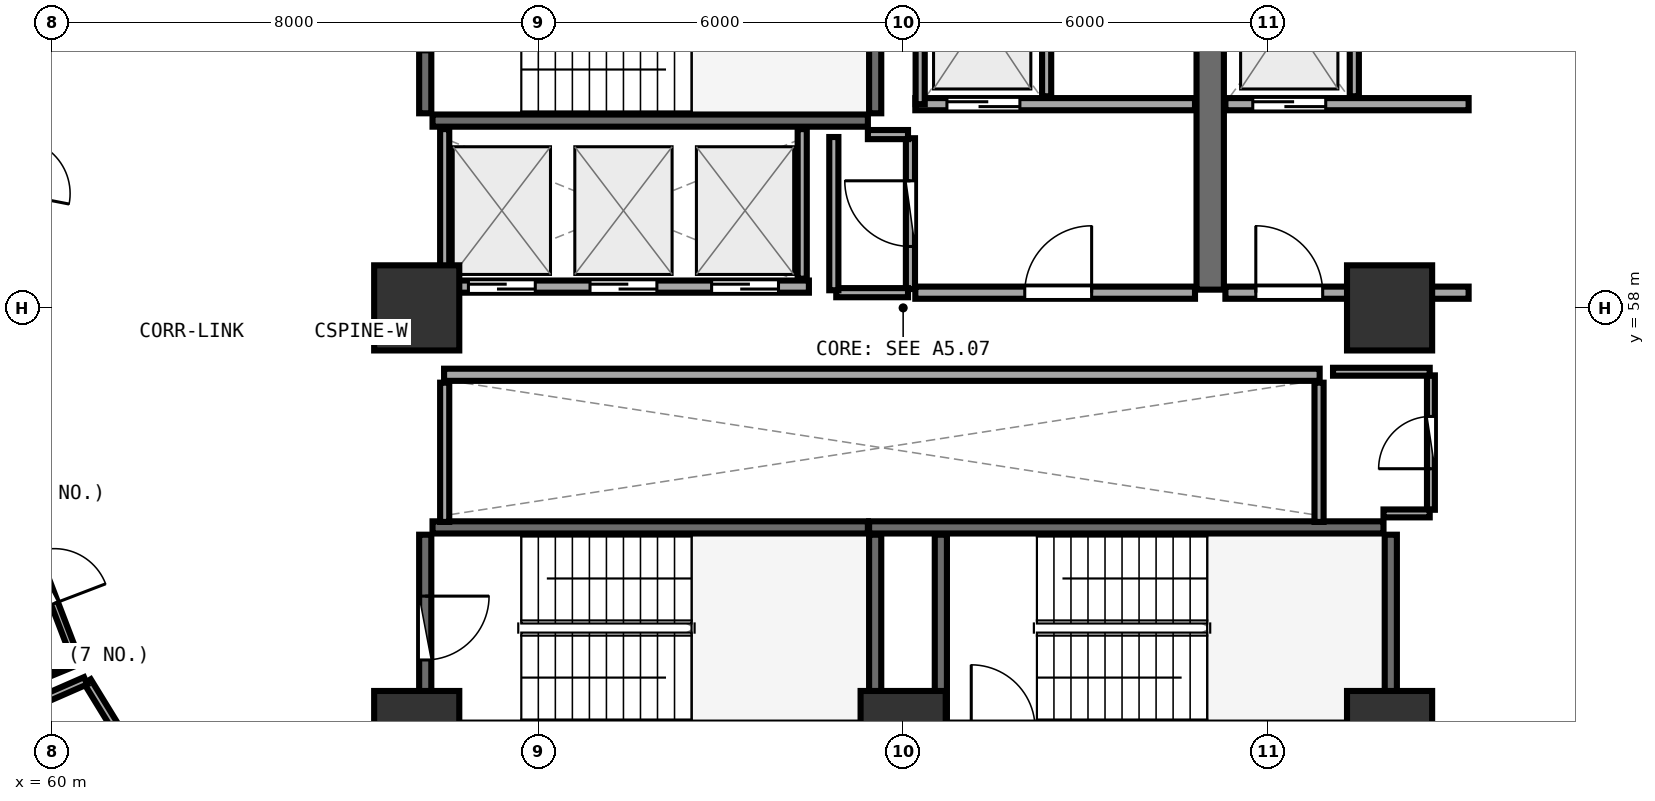
"""IFC4 building model, lengths in metres.
Left out: names, types, materials, properties, quantities, classifications, styles, units other than length and angle.
Written with IfcOpenShell. Run it as: python <this file> out.ifc"""

import sys

from ifc_helpers import new_model, si_unit, direction, frame, frame_2d, origin, origin_2d, place, context, subcontext, project, spatial, rectangle, extrude, element, fill, save


model = new_model("IFC4")
c1 = context("Model", 3, precision=1e-05, world=origin(), true_north=direction((0.0, 1.0)))
c2 = subcontext(c1, "Body", "Model", "MODEL_VIEW")
j1 = project(units=[si_unit("LENGTHUNIT", "METRE"), si_unit("PLANEANGLEUNIT", "RADIAN")], contexts=[c1])
p1 = place(None, origin())
s1 = spatial("IfcSite", under=j1, at=p1, CompositionType="ELEMENT")
p2 = place(p1, origin())
s2 = spatial("IfcBuilding", under=s1, at=p2, CompositionType="ELEMENT")
p3 = place(p2, frame((0.0, 0.0, 33.75)))
s3 = spatial("IfcBuildingStorey", under=s2, at=p3, CompositionType="ELEMENT", Elevation=33.75)
for number, where, z_axis, x_axis in (
    (1, (66.0, 51.0, 0.0), (0.0, 0.0, 1.0), (1.0, 0.0, 0.0)),
    (2, (74.0, 51.0, 0.0), (0.0, 0.0, 1.0), (1.0, 0.0, 0.0)),
    (3, (82.0, 51.0, 0.0), (0.0, 0.0, 1.0), (1.0, 0.0, 0.0)),
    (4, (82.0, 58.0, 0.0), (0.0, 0.0, 1.0), (1.0, 0.0, 0.0)),
    (5, (66.0, 58.0, 0.0), (0.0, 0.0, 1.0), (1.0, 0.0, 0.0)),
):
    element("IfcColumn", number, at=place(p3, frame(where, z_axis=z_axis, x_axis=x_axis)), inside=s3, PredefinedType="PILASTER", context=c2, shape_type="SweptSolid", body=[
        extrude(rectangle(XDim=1.4, YDim=1.4, at=origin_2d()), origin(), (0.0, 0.0, 1.0), 3.75),
    ])
p4 = place(p3, frame((66.26, 61.08, 0.0), z_axis=(0.0, 0.0, 1.0), x_axis=(1.0, 0.0, 0.0)))
e6 = element("IfcWall", 6, at=p4, inside=s3, PredefinedType="SHEAR", context=c2, shape_type="SweptSolid", body=[
    extrude(rectangle(XDim=7.16, YDim=0.2, at=frame_2d((3.58, 0.0))), origin(), (0.0, 0.0, 1.0), 3.49),
])
p5 = place(p3, frame((73.54, 61.2, 0.0), z_axis=(0.0, 0.0, 1.0), x_axis=(0.0, 1.0, 0.0)))
e7 = element("IfcWall", 7, at=p5, inside=s3, PredefinedType="SHEAR", context=c2, shape_type="SweptSolid", body=[
    extrude(rectangle(XDim=3.07, YDim=0.2, at=frame_2d((1.535, 0.0))), origin(), (0.0, 0.0, 1.0), 3.49),
])
p6 = place(p3, frame((66.14, 64.27, 0.0), z_axis=(0.0, 0.0, 1.0), x_axis=(0.0, -1.0, 0.0)))
e8 = element("IfcWall", 8, at=p6, inside=s3, PredefinedType="SHEAR", context=c2, shape_type="SweptSolid", body=[
    extrude(rectangle(XDim=3.07, YDim=0.2, at=frame_2d((1.535, 0.0))), origin(), (0.0, 0.0, 1.0), 3.49),
])
p7 = place(p6, frame((1.01, 0.0, 0.0)))
e9 = element("IfcOpeningElement", 9, at=p7, cuts=e8, PredefinedType="OPENING", context=c2, shape_type="SweptSolid", body=[
    extrude(rectangle(XDim=1.05, YDim=2.1, at=frame_2d((0.525, 1.05))), frame((0.0, 0.11, 0.0), z_axis=(0.0, -1.0, 0.0), x_axis=(1.0, 0.0, 0.0)), (0.0, 0.0, 1.0), 0.22),
])
p8 = place(p3, frame((82.02, 51.2, 0.0), z_axis=(0.0, 0.0, 1.0), x_axis=(0.0, 1.0, 0.0)))
e10 = element("IfcWall", 10, at=p8, inside=s3, PredefinedType="SHEAR", context=c2, shape_type="SweptSolid", body=[
    extrude(rectangle(XDim=3.07, YDim=0.2, at=frame_2d((1.535, 0.0))), origin(), (0.0, 0.0, 1.0), 3.49),
])
p9 = place(p3, frame((81.9, 54.39, 0.0), z_axis=(0.0, 0.0, 1.0), x_axis=(-1.0, 0.0, 0.0)))
e11 = element("IfcWall", 11, at=p9, inside=s3, PredefinedType="SHEAR", context=c2, shape_type="SweptSolid", body=[
    extrude(rectangle(XDim=8.46, YDim=0.2, at=frame_2d((4.23, 0.0))), origin(), (0.0, 0.0, 1.0), 3.49),
])
for number, where, z_axis, x_axis in (
    (12, (74.62, 54.27, 0.0), (0.0, 0.0, 1.0), (0.0, -1.0, 0.0)),
    (13, (73.54, 51.2, 0.0), (0.0, 0.0, 1.0), (0.0, 1.0, 0.0)),
):
    element("IfcWall", number, at=place(p3, frame(where, z_axis=z_axis, x_axis=x_axis)), inside=s3, PredefinedType="SHEAR", context=c2, shape_type="SweptSolid", body=[
        extrude(rectangle(XDim=3.07, YDim=0.2, at=frame_2d((1.535, 0.0))), origin(), (0.0, 0.0, 1.0), 3.49),
    ])
p10 = place(p3, frame((73.42, 54.39, 0.0), z_axis=(0.0, 0.0, 1.0), x_axis=(-1.0, 0.0, 0.0)))
e14 = element("IfcWall", 14, at=p10, inside=s3, PredefinedType="SHEAR", context=c2, shape_type="SweptSolid", body=[
    extrude(rectangle(XDim=7.16, YDim=0.2, at=frame_2d((3.58, 0.0))), origin(), (0.0, 0.0, 1.0), 3.49),
])
p11 = place(p3, frame((66.14, 54.27, 0.0), z_axis=(0.0, 0.0, 1.0), x_axis=(0.0, -1.0, 0.0)))
e15 = element("IfcWall", 15, at=p11, inside=s3, PredefinedType="SHEAR", context=c2, shape_type="SweptSolid", body=[
    extrude(rectangle(XDim=3.07, YDim=0.2, at=frame_2d((1.535, 0.0))), origin(), (0.0, 0.0, 1.0), 3.49),
])
p12 = place(p11, frame((1.01, 0.0, 0.0)))
e16 = element("IfcOpeningElement", 16, at=p12, cuts=e15, PredefinedType="OPENING", context=c2, shape_type="SweptSolid", body=[
    extrude(rectangle(XDim=1.05, YDim=2.1, at=frame_2d((0.525, 1.05))), frame((0.0, 0.11, 0.0), z_axis=(0.0, -1.0, 0.0), x_axis=(1.0, 0.0, 0.0)), (0.0, 0.0, 1.0), 0.22),
])
p13 = place(p3, frame((79.05, 58.3, 0.0), z_axis=(0.0, 0.0, 1.0), x_axis=(0.0, 1.0, 0.0)))
e17 = element("IfcWall", 17, at=p13, inside=s3, PredefinedType="SHEAR", context=c2, shape_type="SweptSolid", body=[
    extrude(rectangle(XDim=6.3, YDim=0.45, at=frame_2d((3.15, 0.0))), origin(), (0.0, 0.0, 1.0), 3.49),
])
p14 = place(p3, frame((74.2, 61.35, 0.0), z_axis=(0.0, 0.0, 1.0), x_axis=(1.0, 0.0, 0.0)))
e18 = element("IfcWall", 18, at=p14, inside=s3, PredefinedType="SOLIDWALL", context=c2, shape_type="SweptSolid", body=[
    extrude(rectangle(XDim=4.6, YDim=0.2, at=frame_2d((2.3, 0.0))), origin(), (0.0, 0.0, 1.0), 3.48),
])
p15 = place(p14, frame((0.52, 0.0, 0.0)))
e19 = element("IfcOpeningElement", 19, at=p15, cuts=e18, PredefinedType="OPENING", context=c2, shape_type="SweptSolid", body=[
    extrude(rectangle(XDim=1.2, YDim=2.15, at=frame_2d((0.6, 1.075))), frame((0.0, 0.11, 0.0), z_axis=(0.0, -1.0, 0.0), x_axis=(1.0, 0.0, 0.0)), (0.0, 0.0, 1.0), 0.22),
])
p16 = place(p3, frame((74.28, 61.35, 0.0), z_axis=(0.0, 0.0, 1.0), x_axis=(0.0, 1.0, 0.0)))
e20 = element("IfcWall", 20, at=p16, inside=s3, PredefinedType="PARTITIONING", context=c2, shape_type="SweptSolid", body=[
    extrude(rectangle(XDim=2.97, YDim=0.15, at=frame_2d((1.485, 0.0))), origin(), (0.0, 0.0, 1.0), 3.48),
])
p17 = place(p3, frame((76.36, 61.48, 0.0), z_axis=(0.0, 0.0, 1.0), x_axis=(0.0, 1.0, 0.0)))
e21 = element("IfcWall", 21, at=p17, inside=s3, PredefinedType="PARTITIONING", context=c2, shape_type="SweptSolid", body=[
    extrude(rectangle(XDim=2.84, YDim=0.15, at=frame_2d((1.42, 0.0))), origin(), (0.0, 0.0, 1.0), 3.48),
])
p18 = place(p3, frame((79.3, 61.35, 0.0), z_axis=(0.0, 0.0, 1.0), x_axis=(1.0, 0.0, 0.0)))
e22 = element("IfcWall", 22, at=p18, inside=s3, PredefinedType="SOLIDWALL", context=c2, shape_type="SweptSolid", body=[
    extrude(rectangle(XDim=4.0, YDim=0.2, at=frame_2d((2.0, 0.0))), origin(), (0.0, 0.0, 1.0), 2.775),
])
p19 = place(p18, frame((0.45, 0.0, 0.0)))
e23 = element("IfcOpeningElement", 23, at=p19, cuts=e22, PredefinedType="OPENING", context=c2, shape_type="SweptSolid", body=[
    extrude(rectangle(XDim=1.2, YDim=2.15, at=frame_2d((0.6, 1.075))), frame((0.0, 0.11, 0.0), z_axis=(0.0, -1.0, 0.0), x_axis=(1.0, 0.0, 0.0)), (0.0, 0.0, 1.0), 0.22),
])
p20 = place(p3, frame((81.42, 61.48, 0.0), z_axis=(0.0, 0.0, 1.0), x_axis=(0.0, 1.0, 0.0)))
e24 = element("IfcWall", 24, at=p20, inside=s3, PredefinedType="PARTITIONING", context=c2, shape_type="SweptSolid", body=[
    extrude(rectangle(XDim=2.84, YDim=0.15, at=frame_2d((1.42, 0.0))), origin(), (0.0, 0.0, 1.0), 3.48),
])
p21 = place(p3, frame((74.2, 58.25, 0.0), z_axis=(0.0, 0.0, 1.0), x_axis=(1.0, 0.0, 0.0)))
e25 = element("IfcWall", 25, at=p21, inside=s3, PredefinedType="SOLIDWALL", context=c2, shape_type="SweptSolid", body=[
    extrude(rectangle(XDim=4.6, YDim=0.2, at=frame_2d((2.3, 0.0))), origin(), (0.0, 0.0, 1.0), 3.48),
])
p22 = place(p21, frame((1.8, 0.0, 0.0)))
e26 = element("IfcOpeningElement", 26, at=p22, cuts=e25, PredefinedType="OPENING", context=c2, shape_type="SweptSolid", body=[
    extrude(rectangle(XDim=1.1, YDim=2.1, at=frame_2d((0.55, 1.05))), frame((0.0, 0.11, 0.0), z_axis=(0.0, -1.0, 0.0), x_axis=(1.0, 0.0, 0.0)), (0.0, 0.0, 1.0), 0.22),
])
p23 = place(p3, frame((79.3, 58.25, 0.0), z_axis=(0.0, 0.0, 1.0), x_axis=(1.0, 0.0, 0.0)))
e27 = element("IfcWall", 27, at=p23, inside=s3, PredefinedType="SOLIDWALL", context=c2, shape_type="SweptSolid", body=[
    extrude(rectangle(XDim=4.0, YDim=0.2, at=frame_2d((2.0, 0.0))), origin(), (0.0, 0.0, 1.0), 2.775),
])
p24 = place(p23, frame((0.5, 0.0, 0.0)))
e28 = element("IfcOpeningElement", 28, at=p24, cuts=e27, PredefinedType="OPENING", context=c2, shape_type="SweptSolid", body=[
    extrude(rectangle(XDim=1.1, YDim=2.1, at=frame_2d((0.55, 1.05))), frame((0.0, 0.11, 0.0), z_axis=(0.0, -1.0, 0.0), x_axis=(1.0, 0.0, 0.0)), (0.0, 0.0, 1.0), 0.22),
])
p25 = place(p3, frame((66.45, 58.35, 0.0), z_axis=(0.0, 0.0, 1.0), x_axis=(1.0, 0.0, 0.0)))
e29 = element("IfcWall", 29, at=p25, inside=s3, PredefinedType="SOLIDWALL", context=c2, shape_type="SweptSolid", body=[
    extrude(rectangle(XDim=6.0, YDim=0.2, at=frame_2d((3.0, 0.0))), origin(), (0.0, 0.0, 1.0), 3.48),
])
p26 = place(p25, frame((0.4, 0.0, 0.0)))
e30 = element("IfcOpeningElement", 30, at=p26, cuts=e29, PredefinedType="OPENING", context=c2, shape_type="SweptSolid", body=[
    extrude(rectangle(XDim=1.1, YDim=2.1, at=frame_2d((0.55, 1.05))), frame((0.0, 0.11, 0.0), z_axis=(0.0, -1.0, 0.0), x_axis=(1.0, 0.0, 0.0)), (0.0, 0.0, 1.0), 0.22),
])
p27 = place(p25, frame((2.4, 0.0, 0.0)))
e31 = element("IfcOpeningElement", 31, at=p27, cuts=e29, PredefinedType="OPENING", context=c2, shape_type="SweptSolid", body=[
    extrude(rectangle(XDim=1.1, YDim=2.1, at=frame_2d((0.55, 1.05))), frame((0.0, 0.11, 0.0), z_axis=(0.0, -1.0, 0.0), x_axis=(1.0, 0.0, 0.0)), (0.0, 0.0, 1.0), 0.22),
])
p28 = place(p25, frame((4.4, 0.0, 0.0)))
e32 = element("IfcOpeningElement", 32, at=p28, cuts=e29, PredefinedType="OPENING", context=c2, shape_type="SweptSolid", body=[
    extrude(rectangle(XDim=1.1, YDim=2.1, at=frame_2d((0.55, 1.05))), frame((0.0, 0.11, 0.0), z_axis=(0.0, -1.0, 0.0), x_axis=(1.0, 0.0, 0.0)), (0.0, 0.0, 1.0), 0.22),
])
for number, where, z_axis, x_axis in (
    (33, (66.46, 58.48, 0.0), (0.0, 0.0, 1.0), (0.0, 1.0, 0.0)),
    (34, (72.34, 58.48, 0.0), (0.0, 0.0, 1.0), (0.0, 1.0, 0.0)),
):
    element("IfcWall", number, at=place(p3, frame(where, z_axis=z_axis, x_axis=x_axis)), inside=s3, PredefinedType="PARTITIONING", context=c2, shape_type="SweptSolid", body=[
        extrude(rectangle(XDim=2.46, YDim=0.15, at=frame_2d((1.23, 0.0))), origin(), (0.0, 0.0, 1.0), 3.48),
    ])
p29 = place(p3, frame((66.45, 56.9, 0.0), z_axis=(0.0, 0.0, 1.0), x_axis=(1.0, 0.0, 0.0)))
e35 = element("IfcWall", 35, at=p29, inside=s3, PredefinedType="SOLIDWALL", context=c2, shape_type="SweptSolid", body=[
    extrude(rectangle(XDim=14.4, YDim=0.2, at=frame_2d((7.2, 0.0))), origin(), (0.0, 0.0, 1.0), 3.48),
])
for number, where, z_axis, x_axis in (
    (36, (66.46, 54.48, 0.0), (0.0, 0.0, 1.0), (0.0, 1.0, 0.0)),
    (37, (80.84, 54.48, 0.0), (0.0, 0.0, 1.0), (0.0, 1.0, 0.0)),
):
    element("IfcWall", number, at=place(p3, frame(where, z_axis=z_axis, x_axis=x_axis)), inside=s3, PredefinedType="PARTITIONING", context=c2, shape_type="SweptSolid", body=[
        extrude(rectangle(XDim=2.29, YDim=0.15, at=frame_2d((1.145, 0.0))), origin(), (0.0, 0.0, 1.0), 3.48),
    ])
p30 = place(p3, frame((74.12, 58.31, 0.0), z_axis=(0.0, 0.0, 1.0), x_axis=(0.0, 1.0, 0.0)))
e38 = element("IfcWall", 38, at=p30, inside=s3, PredefinedType="PARTITIONING", context=c2, shape_type="SweptSolid", body=[
    extrude(rectangle(XDim=2.48, YDim=0.15, at=frame_2d((1.24, 0.0))), origin(), (0.0, 0.0, 1.0), 3.48),
])
p31 = place(p30, frame((0.7, 0.0, 0.0)))
e39 = element("IfcOpeningElement", 39, at=p31, cuts=e38, PredefinedType="OPENING", context=c2, shape_type="SweptSolid", body=[
    extrude(rectangle(XDim=1.08, YDim=2.1, at=frame_2d((0.54, 1.05))), frame((0.0, 0.085, 0.0), z_axis=(0.0, -1.0, 0.0), x_axis=(1.0, 0.0, 0.0)), (0.0, 0.0, 1.0), 0.17),
])
p32 = place(p3, frame((82.68, 54.68, 0.0), z_axis=(0.0, 0.0, 1.0), x_axis=(0.0, 1.0, 0.0)))
e40 = element("IfcWall", 40, at=p32, inside=s3, PredefinedType="PLUMBINGWALL", context=c2, shape_type="SweptSolid", body=[
    extrude(rectangle(XDim=2.21, YDim=0.13, at=frame_2d((1.105, 0.0))), origin(), (0.0, 0.0, 1.0), 3.48),
])
p33 = place(p32, frame((0.675, 0.0, 0.0)))
e41 = element("IfcOpeningElement", 41, at=p33, cuts=e40, PredefinedType="OPENING", context=c2, shape_type="SweptSolid", body=[
    extrude(rectangle(XDim=0.86, YDim=2.05, at=frame_2d((0.43, 1.025))), frame((0.0, 0.075, 0.0), z_axis=(0.0, -1.0, 0.0), x_axis=(1.0, 0.0, 0.0)), (0.0, 0.0, 1.0), 0.15),
])
p34 = place(p3, frame((59.986, 62.892, 0.0), z_axis=(0.0, 0.0, 1.0), x_axis=(-0.190897102704, -0.981610053015, 0.0)))
e42 = element("IfcWall", 42, at=p34, inside=s3, PredefinedType="PARTITIONING", context=c2, shape_type="SweptSolid", body=[
    extrude(rectangle(XDim=5.239, YDim=0.12, at=frame_2d((2.619, 0.0))), origin(), (0.0, 0.0, 1.0), 2.875),
])
p35 = place(p34, frame((2.169, 0.0, 0.0)))
e43 = element("IfcOpeningElement", 43, at=p35, cuts=e42, PredefinedType="OPENING", context=c2, shape_type="SweptSolid", body=[
    extrude(rectangle(XDim=0.9, YDim=2.08, at=frame_2d((0.45, 1.04))), frame((0.0, 0.07, 0.0), z_axis=(0.0, -1.0, 0.0), x_axis=(1.0, 0.0, 0.0)), (0.0, 0.0, 1.0), 0.14),
])
p36 = place(p3, frame((59.373, 54.891, 0.0), z_axis=(0.0, 0.0, 1.0), x_axis=(0.357203455119, -0.934026601147, 0.0)))
e44 = element("IfcWall", 44, at=p36, inside=s3, PredefinedType="PARTITIONING", context=c2, shape_type="SweptSolid", body=[
    extrude(rectangle(XDim=2.848, YDim=0.12, at=frame_2d((1.424, 0.0))), origin(), (0.0, 0.0, 1.0), 3.48),
])
p37 = place(p36, frame((0.974, 0.0, 0.0)))
e45 = element("IfcOpeningElement", 45, at=p37, cuts=e44, PredefinedType="OPENING", context=c2, shape_type="SweptSolid", body=[
    extrude(rectangle(XDim=0.9, YDim=2.08, at=frame_2d((0.45, 1.04))), frame((0.0, 0.07, 0.0), z_axis=(0.0, -1.0, 0.0), x_axis=(1.0, 0.0, 0.0)), (0.0, 0.0, 1.0), 0.14),
])
p38 = place(p3, frame((72.9, 58.25, 0.0), z_axis=(0.0, 0.0, 1.0), x_axis=(1.0, 0.0, 0.0)))
e46 = element("IfcWall", 46, at=p38, inside=s3, PredefinedType="PARTITIONING", context=c2, shape_type="SweptSolid", body=[
    extrude(rectangle(XDim=1.18, YDim=0.15, at=frame_2d((0.59, 0.0))), origin(), (0.0, 0.0, 1.0), 3.48),
])
p39 = place(p3, frame((74.08, 60.85, 0.0), z_axis=(0.0, 0.0, 1.0), x_axis=(-1.0, 0.0, 0.0)))
e47 = element("IfcWall", 47, at=p39, inside=s3, PredefinedType="PARTITIONING", context=c2, shape_type="SweptSolid", body=[
    extrude(rectangle(XDim=0.66, YDim=0.15, at=frame_2d((0.33, 0.0))), origin(), (0.0, 0.0, 1.0), 3.48),
])
p40 = place(p3, frame((72.86, 60.81, 0.0), z_axis=(0.0, 0.0, 1.0), x_axis=(0.0, -1.0, 0.0)))
e48 = element("IfcWall", 48, at=p40, inside=s3, PredefinedType="PARTITIONING", context=c2, shape_type="SweptSolid", body=[
    extrude(rectangle(XDim=2.52, YDim=0.15, at=frame_2d((1.26, 0.0))), origin(), (0.0, 0.0, 1.0), 3.48),
])
p41 = place(p3, frame((81.9, 54.62, 0.0), z_axis=(0.0, 0.0, 1.0), x_axis=(1.0, 0.0, 0.0)))
e49 = element("IfcWall", 49, at=p41, inside=s3, PredefinedType="PLUMBINGWALL", context=c2, shape_type="SweptSolid", body=[
    extrude(rectangle(XDim=0.76, YDim=0.13, at=frame_2d((0.38, 0.0))), origin(), (0.0, 0.0, 1.0), 2.775),
])
p42 = place(p3, frame((82.66, 56.95, 0.0), z_axis=(0.0, 0.0, 1.0), x_axis=(-1.0, 0.0, 0.0)))
e50 = element("IfcWall", 50, at=p42, inside=s3, PredefinedType="PLUMBINGWALL", context=c2, shape_type="SweptSolid", body=[
    extrude(rectangle(XDim=1.59, YDim=0.13, at=frame_2d((0.795, 0.0))), origin(), (0.0, 0.0, 1.0), 2.775),
])
p43 = place(p3, frame((60.375, 52.16, 0.0), z_axis=(0.0, 0.0, 1.0), x_axis=(-0.924608681042, -0.380918346817, 0.0)))
e51 = element("IfcWall", 51, at=p43, inside=s3, PredefinedType="PARTITIONING", context=c2, shape_type="SweptSolid", body=[
    extrude(rectangle(XDim=12.094, YDim=0.1, at=frame_2d((6.047, 0.0))), origin(), (0.0, 0.0, 1.0), 2.875),
])
p44 = place(p3, frame((60.583, 51.859, 0.0), z_axis=(0.0, 0.0, 1.0), x_axis=(0.52310141153, -0.852270446077, 0.0)))
e52 = element("IfcWall", 52, at=p44, inside=s3, PredefinedType="PLUMBINGWALL", context=c2, shape_type="SweptSolid", body=[
    extrude(rectangle(XDim=1.135, YDim=0.13, at=frame_2d((0.568, 0.0))), origin(), (0.0, 0.0, 1.0), 3.48),
])
p45 = place(p3, frame((56.4, 50.049, 0.0), z_axis=(0.0, 0.0, 1.0), x_axis=(0.91604857307, 0.401067340701, 0.0)))
e53 = element("IfcWall", 53, at=p45, inside=s3, PredefinedType="PLUMBINGWALL", context=c2, shape_type="SweptSolid", body=[
    extrude(rectangle(XDim=4.535, YDim=0.13, at=frame_2d((2.268, 0.0))), origin(), (0.0, 0.0, 1.0), 2.875),
])
p46 = place(p12, origin())
e54 = element("IfcDoor", 54, at=p46, inside=s3, OperationType="SINGLE_SWING_LEFT", PredefinedType="DOOR", context=c2, shape_type="SweptSolid", body=[
    extrude(rectangle(XDim=1.05, YDim=2.1, at=frame_2d((0.525, 1.05))), frame((0.0, 0.025, 0.0), z_axis=(0.0, -1.0, 0.0), x_axis=(1.0, 0.0, 0.0)), (0.0, 0.0, 1.0), 0.05),
])
fill(e16, e54)
p47 = place(p15, origin())
e55 = element("IfcDoor", 55, at=p47, inside=s3, OperationType="DOUBLE_DOOR_SLIDING", PredefinedType="DOOR", context=c2, shape_type="SweptSolid", body=[
    extrude(rectangle(XDim=1.2, YDim=2.15, at=frame_2d((0.6, 1.075))), frame((0.0, 0.025, 0.0), z_axis=(0.0, -1.0, 0.0), x_axis=(1.0, 0.0, 0.0)), (0.0, 0.0, 1.0), 0.05),
])
fill(e19, e55)
p48 = place(p19, origin())
e56 = element("IfcDoor", 56, at=p48, inside=s3, OperationType="DOUBLE_DOOR_SLIDING", PredefinedType="DOOR", context=c2, shape_type="SweptSolid", body=[
    extrude(rectangle(XDim=1.2, YDim=2.15, at=frame_2d((0.6, 1.075))), frame((0.0, 0.025, 0.0), z_axis=(0.0, -1.0, 0.0), x_axis=(1.0, 0.0, 0.0)), (0.0, 0.0, 1.0), 0.05),
])
fill(e23, e56)
p49 = place(p22, frame((1.1, 0.0, 0.0), z_axis=(0.0, 0.0, 1.0), x_axis=(-1.0, 0.0, 0.0)))
e57 = element("IfcDoor", 57, at=p49, inside=s3, OperationType="SINGLE_SWING_LEFT", PredefinedType="DOOR", context=c2, shape_type="SweptSolid", body=[
    extrude(rectangle(XDim=1.1, YDim=2.1, at=frame_2d((0.55, 1.05))), frame((0.0, 0.025, 0.0), z_axis=(0.0, -1.0, 0.0), x_axis=(1.0, 0.0, 0.0)), (0.0, 0.0, 1.0), 0.05),
])
fill(e26, e57)
p50 = place(p24, frame((1.1, 0.0, 0.0), z_axis=(0.0, 0.0, 1.0), x_axis=(-1.0, 0.0, 0.0)))
e58 = element("IfcDoor", 58, at=p50, inside=s3, OperationType="SINGLE_SWING_RIGHT", PredefinedType="DOOR", context=c2, shape_type="SweptSolid", body=[
    extrude(rectangle(XDim=1.1, YDim=2.1, at=frame_2d((0.55, 1.05))), frame((0.0, 0.025, 0.0), z_axis=(0.0, -1.0, 0.0), x_axis=(1.0, 0.0, 0.0)), (0.0, 0.0, 1.0), 0.05),
])
fill(e28, e58)
p51 = place(p26, origin())
e59 = element("IfcDoor", 59, at=p51, inside=s3, OperationType="DOUBLE_DOOR_SLIDING", PredefinedType="DOOR", context=c2, shape_type="SweptSolid", body=[
    extrude(rectangle(XDim=1.1, YDim=2.1, at=frame_2d((0.55, 1.05))), frame((0.0, 0.025, 0.0), z_axis=(0.0, -1.0, 0.0), x_axis=(1.0, 0.0, 0.0)), (0.0, 0.0, 1.0), 0.05),
])
fill(e30, e59)
p52 = place(p27, origin())
e60 = element("IfcDoor", 60, at=p52, inside=s3, OperationType="DOUBLE_DOOR_SLIDING", PredefinedType="DOOR", context=c2, shape_type="SweptSolid", body=[
    extrude(rectangle(XDim=1.1, YDim=2.1, at=frame_2d((0.55, 1.05))), frame((0.0, 0.025, 0.0), z_axis=(0.0, -1.0, 0.0), x_axis=(1.0, 0.0, 0.0)), (0.0, 0.0, 1.0), 0.05),
])
fill(e31, e60)
p53 = place(p28, origin())
e61 = element("IfcDoor", 61, at=p53, inside=s3, OperationType="DOUBLE_DOOR_SLIDING", PredefinedType="DOOR", context=c2, shape_type="SweptSolid", body=[
    extrude(rectangle(XDim=1.1, YDim=2.1, at=frame_2d((0.55, 1.05))), frame((0.0, 0.025, 0.0), z_axis=(0.0, -1.0, 0.0), x_axis=(1.0, 0.0, 0.0)), (0.0, 0.0, 1.0), 0.05),
])
fill(e32, e61)
p54 = place(p31, origin())
e62 = element("IfcDoor", 62, at=p54, inside=s3, OperationType="SINGLE_SWING_RIGHT", PredefinedType="DOOR", context=c2, shape_type="SweptSolid", body=[
    extrude(rectangle(XDim=1.08, YDim=2.1, at=frame_2d((0.54, 1.05))), frame((0.0, 0.025, 0.0), z_axis=(0.0, -1.0, 0.0), x_axis=(1.0, 0.0, 0.0)), (0.0, 0.0, 1.0), 0.05),
])
fill(e39, e62)
p55 = place(p33, origin())
e63 = element("IfcDoor", 63, at=p55, inside=s3, OperationType="SINGLE_SWING_LEFT", PredefinedType="DOOR", context=c2, shape_type="SweptSolid", body=[
    extrude(rectangle(XDim=0.86, YDim=2.05, at=frame_2d((0.43, 1.025))), frame((0.0, 0.025, 0.0), z_axis=(0.0, -1.0, 0.0), x_axis=(1.0, 0.0, 0.0)), (0.0, 0.0, 1.0), 0.05),
])
fill(e41, e63)
p56 = place(p37, origin())
e64 = element("IfcDoor", 64, at=p56, inside=s3, OperationType="SINGLE_SWING_RIGHT", PredefinedType="DOOR", context=c2, shape_type="SweptSolid", body=[
    extrude(rectangle(XDim=0.9, YDim=2.08, at=frame_2d((0.45, 1.04))), frame((0.0, 0.025, 0.0), z_axis=(0.0, -1.0, 0.0), x_axis=(1.0, 0.0, 0.0)), (0.0, 0.0, 1.0), 0.05),
])
fill(e45, e64)
save(model, sys.argv[1])
